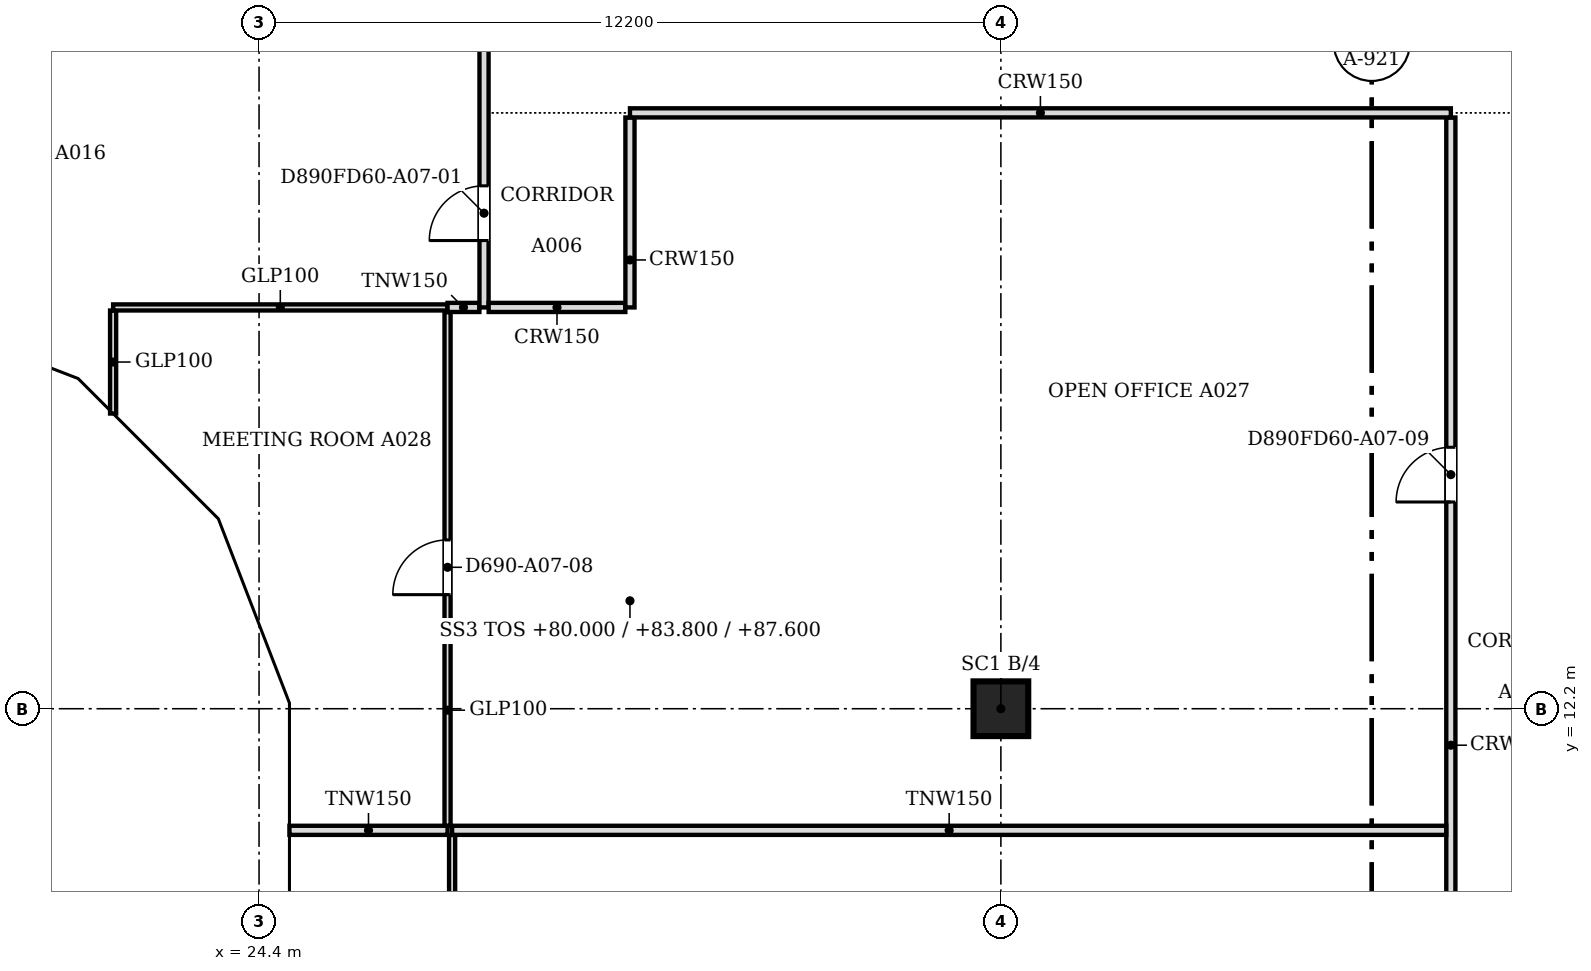
"""IFC4 building model, lengths in metres.
Left out: names, types, materials, properties, quantities, classifications, styles, units other than length and angle.
Written with IfcOpenShell. Run it as: python <this file> out.ifc"""

import sys

from ifc_helpers import new_model, si_unit, direction, frame, frame_2d, origin, origin_2d, place, context, subcontext, project, spatial, polyline, rectangle, outline, extrude, faceted_brep, source, transform, mapped, element, fill, save


model = new_model("IFC4")
c1 = context("Model", 3, precision=1e-05, world=origin(), true_north=direction((0.0, 1.0)))
c2 = subcontext(c1, "Body", "Model", "MODEL_VIEW")
j1 = project(units=[si_unit("LENGTHUNIT", "METRE"), si_unit("PLANEANGLEUNIT", "RADIAN")], contexts=[c1])
p1 = place(None, origin())
s1 = spatial("IfcSite", under=j1, at=p1, CompositionType="ELEMENT")
p2 = place(p1, origin())
s2 = spatial("IfcBuilding", under=s1, at=p2, CompositionType="ELEMENT")
p3 = place(p2, frame((0.0, 0.0, 80.0)))
s3 = spatial("IfcBuildingStorey", under=s2, at=p3, CompositionType="ELEMENT", Elevation=80.0)
p4 = place(p3, frame((36.6, 12.2, 0.0), z_axis=(0.0, 0.0, 1.0), x_axis=(1.0, 0.0, 0.0)))
e1 = element("IfcColumn", 1, at=p4, inside=s3, PredefinedType="COLUMN", context=c2, shape_type="SweptSolid", body=[
    extrude(rectangle(XDim=0.9, YDim=0.9, at=origin_2d()), origin(), (0.0, 0.0, 1.0), 3.6),
])
m1 = source(origin(), c2, "Body", "Brep", [
    faceted_brep([(3.096, -0.25, 7.536), (0.047, -0.25, 3.856), (0.047, -0.25, 3.744), (3.096, -0.25, 0.064), (0.0, 0.25, 3.8), (3.149, 0.25, 7.6), (3.202, 0.25, 7.536), (3.202, 0.25, 0.064), (3.149, 0.25, 0.0), (3.149, -0.0, 0.0), (3.149, -0.0, 7.6), (0.0, 0.0, 3.8)], [[[0, 1, 2, 3]], [[4, 5, 6, 7, 8]], [[8, 7, 9]], [[6, 5, 10]], [[5, 4, 11, 1, 0, 10]], [[4, 8, 9, 3, 2, 11]], [[11, 2, 1]], [[3, 9, 7, 6, 10, 0]]]),
])
p5 = place(p3, frame((18.346, 18.55, -3.8), z_axis=(0.0, 0.0, 1.0), x_axis=(0.932985567668, -0.359913782069, 0.0)))
e2 = element("IfcWall", 2, at=p5, inside=s3, PredefinedType="SOLIDWALL", context=c2, shape_type="MappedRepresentation", body=[
    mapped(m1, transform((0.0, 0.0, 0.0), scale=1.0)),
])
m2 = source(origin(), c2, "Body", "SweptSolid", [
    extrude(outline(polyline([(2.949, 6.967), (0.325, 3.8), (2.949, 0.633), (2.949, 6.967)])), frame((0.0, 0.26, 0.0), z_axis=(0.0, -1.0, 0.0), x_axis=(1.0, 0.0, 0.0)), (0.0, 0.0, 1.0), 0.52),
])
p6 = place(p5, origin())
e3 = element("IfcOpeningElement", 3, at=p6, cuts=e2, PredefinedType="OPENING", context=c2, shape_type="MappedRepresentation", body=[
    mapped(m2, transform((0.0, 0.0, 0.0), scale=1.0)),
])
m3 = source(origin(), c2, "Body", "Brep", [
    faceted_brep([(0.106, -0.25, 0.064), (3.156, -0.25, 3.736), (3.156, -0.25, 3.864), (0.106, -0.25, 7.536), (0.0, 0.25, 7.536), (0.053, 0.25, 7.6), (3.209, 0.25, 3.8), (0.053, 0.25, 0.0), (0.0, 0.25, 0.064), (3.209, -0.0, 3.8), (0.053, 0.0, 0.0), (0.053, 0.0, 7.6)], [[[0, 1, 2, 3]], [[4, 5, 6, 7, 8]], [[7, 6, 9, 1, 0, 10]], [[6, 5, 11, 3, 2, 9]], [[5, 4, 11]], [[8, 7, 10]], [[8, 10, 0, 3, 11, 4]], [[1, 9, 2]]]),
])
p7 = place(p3, frame((21.248, 17.454, -3.8), z_axis=(0.0, 0.0, 1.0), x_axis=(0.707106781187, -0.707106781187, 0.0)))
e4 = element("IfcWall", 4, at=p7, inside=s3, PredefinedType="SOLIDWALL", context=c2, shape_type="MappedRepresentation", body=[
    mapped(m3, transform((0.0, 0.0, 0.0), scale=1.0)),
])
m4 = source(origin(), c2, "Body", "SweptSolid", [
    extrude(outline(polyline([(0.253, 0.632), (2.884, 3.8), (0.253, 6.968), (0.253, 0.632)])), frame((0.0, 0.26, 0.0), z_axis=(0.0, -1.0, 0.0), x_axis=(1.0, 0.0, 0.0)), (0.0, 0.0, 1.0), 0.52),
])
p8 = place(p7, origin())
e5 = element("IfcOpeningElement", 5, at=p8, cuts=e4, PredefinedType="OPENING", context=c2, shape_type="MappedRepresentation", body=[
    mapped(m4, transform((0.0, 0.0, 0.0), scale=1.0)),
])
m5 = source(origin(), c2, "Body", "Brep", [
    faceted_brep([(3.103, -0.25, 7.544), (0.053, -0.25, 3.864), (0.053, -0.25, 3.736), (3.103, -0.25, 0.056), (0.0, 0.25, 3.8), (3.149, 0.25, 7.6), (3.196, 0.25, 7.543), (3.196, 0.25, 0.057), (3.149, 0.25, 0.0), (3.149, -0.0, 0.0), (3.149, -0.0, 7.6), (0.0, 0.0, 3.8)], [[[0, 1, 2, 3]], [[4, 5, 6, 7, 8]], [[8, 7, 9]], [[6, 5, 10]], [[5, 4, 11, 1, 0, 10]], [[4, 8, 9, 3, 2, 11]], [[11, 2, 1]], [[3, 9, 7, 6, 10, 0]]]),
])
p9 = place(p3, frame((23.517, 15.185, -3.8), z_axis=(0.0, 0.0, 1.0), x_axis=(0.359864468756, -0.933004589553, 0.0)))
e6 = element("IfcWall", 6, at=p9, inside=s3, PredefinedType="SOLIDWALL", context=c2, shape_type="MappedRepresentation", body=[
    mapped(m5, transform((0.0, 0.0, 0.0), scale=1.0)),
])
p10 = place(p9, origin())
e7 = element("IfcOpeningElement", 7, at=p10, cuts=e6, PredefinedType="OPENING", context=c2, shape_type="MappedRepresentation", body=[
    mapped(m2, transform((0.0, 0.0, 0.0), scale=1.0)),
])
m6 = source(origin(), c2, "Body", "Brep", [
    faceted_brep([(0.093, -0.25, 0.057), (3.143, -0.25, 3.8), (0.093, -0.25, 7.543), (0.0, 0.25, 7.544), (0.047, 0.25, 7.6), (3.143, 0.25, 3.8), (0.047, 0.25, 0.0), (0.0, 0.25, 0.056), (0.047, 0.0, 0.0), (0.047, 0.0, 7.6)], [[[0, 1, 2]], [[3, 4, 5, 6, 7]], [[6, 5, 1, 0, 8]], [[5, 4, 9, 2, 1]], [[4, 3, 9]], [[7, 6, 8]], [[7, 8, 0, 2, 9, 3]]]),
])
p11 = place(p3, frame((24.65, 12.293, -3.8), z_axis=(0.0, 0.0, 1.0), x_axis=(0.0, -1.0, 0.0)))
e8 = element("IfcWall", 8, at=p11, inside=s3, PredefinedType="SOLIDWALL", context=c2, shape_type="MappedRepresentation", body=[
    mapped(m6, transform((0.0, 0.0, 0.0), scale=1.0)),
])
m7 = source(origin(), c2, "Body", "SweptSolid", [
    extrude(outline(polyline([(0.247, 0.641), (2.821, 3.8), (0.247, 6.959), (0.247, 0.641)])), frame((0.0, 0.26, 0.0), z_axis=(0.0, -1.0, 0.0), x_axis=(1.0, 0.0, 0.0)), (0.0, 0.0, 1.0), 0.52),
])
p12 = place(p11, origin())
e9 = element("IfcOpeningElement", 9, at=p12, cuts=e8, PredefinedType="OPENING", context=c2, shape_type="MappedRepresentation", body=[
    mapped(m7, transform((0.0, 0.0, 0.0), scale=1.0)),
])
p13 = place(p2, frame((0.0, 0.0, 83.8)))
s4 = spatial("IfcBuildingStorey", under=s2, at=p13, CompositionType="ELEMENT", Elevation=83.8)
m8 = source(origin(), c2, "Body", "Brep", [
    faceted_brep([(0.093, -0.25, 0.056), (3.143, -0.25, 3.736), (3.143, -0.25, 3.864), (0.093, -0.25, 7.544), (0.0, 0.25, 7.543), (0.047, 0.25, 7.6), (3.196, 0.25, 3.8), (0.047, 0.25, 0.0), (0.0, 0.25, 0.057), (3.196, -0.0, 3.8), (0.047, 0.0, 0.0), (0.047, 0.0, 7.6)], [[[0, 1, 2, 3]], [[4, 5, 6, 7, 8]], [[7, 6, 9, 1, 0, 10]], [[6, 5, 11, 3, 2, 9]], [[5, 4, 11]], [[8, 7, 10]], [[8, 10, 0, 3, 11, 4]], [[1, 9, 2]]]),
])
p14 = place(p13, frame((18.303, 18.567, -3.8), z_axis=(0.0, 0.0, 1.0), x_axis=(0.932978940178, -0.359930961693, 0.0)))
e10 = element("IfcWall", 10, at=p14, inside=s4, PredefinedType="SOLIDWALL", context=c2, shape_type="MappedRepresentation", body=[
    mapped(m8, transform((0.0, 0.0, 0.0), scale=1.0)),
])
m9 = source(origin(), c2, "Body", "SweptSolid", [
    extrude(outline(polyline([(0.247, 0.633), (2.871, 3.8), (0.247, 6.967), (0.247, 0.633)])), frame((0.0, 0.26, 0.0), z_axis=(0.0, -1.0, 0.0), x_axis=(1.0, 0.0, 0.0)), (0.0, 0.0, 1.0), 0.52),
])
p15 = place(p14, origin())
e11 = element("IfcOpeningElement", 11, at=p15, cuts=e10, PredefinedType="OPENING", context=c2, shape_type="MappedRepresentation", body=[
    mapped(m9, transform((0.0, 0.0, 0.0), scale=1.0)),
])
m10 = source(origin(), c2, "Body", "Brep", [
    faceted_brep([(3.103, -0.25, 7.536), (0.053, -0.25, 3.864), (0.053, -0.25, 3.736), (3.103, -0.25, 0.064), (0.0, 0.25, 3.8), (3.156, 0.25, 7.6), (3.209, 0.25, 7.536), (3.209, 0.25, 0.064), (3.156, 0.25, 0.0), (3.156, -0.0, 0.0), (3.156, -0.0, 7.6), (0.0, 0.0, 3.8)], [[[0, 1, 2, 3]], [[4, 5, 6, 7, 8]], [[8, 7, 9]], [[6, 5, 10]], [[5, 4, 11, 1, 0, 10]], [[4, 8, 9, 3, 2, 11]], [[11, 2, 1]], [[3, 9, 7, 6, 10, 0]]]),
])
p16 = place(p13, frame((21.285, 17.417, -3.8), z_axis=(0.0, 0.0, 1.0), x_axis=(0.707106781187, -0.707106781187, 0.0)))
e12 = element("IfcWall", 12, at=p16, inside=s4, PredefinedType="SOLIDWALL", context=c2, shape_type="MappedRepresentation", body=[
    mapped(m10, transform((0.0, 0.0, 0.0), scale=1.0)),
])
m11 = source(origin(), c2, "Body", "SweptSolid", [
    extrude(outline(polyline([(2.956, 6.968), (0.325, 3.8), (2.956, 0.632), (2.956, 6.968)])), frame((0.0, 0.26, 0.0), z_axis=(0.0, -1.0, 0.0), x_axis=(1.0, 0.0, 0.0)), (0.0, 0.0, 1.0), 0.52),
])
p17 = place(p16, origin())
e13 = element("IfcOpeningElement", 13, at=p17, cuts=e12, PredefinedType="OPENING", context=c2, shape_type="MappedRepresentation", body=[
    mapped(m11, transform((0.0, 0.0, 0.0), scale=1.0)),
])
m12 = source(origin(), c2, "Body", "Brep", [
    faceted_brep([(0.106, -0.25, 0.064), (3.156, -0.25, 3.744), (3.156, -0.25, 3.856), (0.106, -0.25, 7.536), (0.0, 0.25, 7.536), (0.053, 0.25, 7.6), (3.202, 0.25, 3.8), (0.053, 0.25, 0.0), (0.0, 0.25, 0.064), (3.202, -0.0, 3.8), (0.053, 0.0, 0.0), (0.053, 0.0, 7.6)], [[[0, 1, 2, 3]], [[4, 5, 6, 7, 8]], [[7, 6, 9, 1, 0, 10]], [[6, 5, 11, 3, 2, 9]], [[5, 4, 11]], [[8, 7, 10]], [[8, 10, 0, 3, 11, 4]], [[1, 9, 2]]]),
])
p18 = place(p13, frame((23.497, 15.234, -3.8), z_axis=(0.0, 0.0, 1.0), x_axis=(0.359913782069, -0.932985567668, 0.0)))
e14 = element("IfcWall", 14, at=p18, inside=s4, PredefinedType="SOLIDWALL", context=c2, shape_type="MappedRepresentation", body=[
    mapped(m12, transform((0.0, 0.0, 0.0), scale=1.0)),
])
m13 = source(origin(), c2, "Body", "SweptSolid", [
    extrude(outline(polyline([(0.253, 0.633), (2.878, 3.8), (0.253, 6.967), (0.253, 0.633)])), frame((0.0, 0.26, 0.0), z_axis=(0.0, -1.0, 0.0), x_axis=(1.0, 0.0, 0.0)), (0.0, 0.0, 1.0), 0.52),
])
p19 = place(p18, origin())
e15 = element("IfcOpeningElement", 15, at=p19, cuts=e14, PredefinedType="OPENING", context=c2, shape_type="MappedRepresentation", body=[
    mapped(m13, transform((0.0, 0.0, 0.0), scale=1.0)),
])
m14 = source(origin(), c2, "Body", "Brep", [
    faceted_brep([(3.096, -0.25, 0.0), (6.1, -0.25, 3.8), (3.096, -0.25, 7.6), (0.047, -0.25, 3.857), (0.047, -0.25, 3.743), (0.0, 0.25, 3.8), (3.096, 0.25, 7.6), (6.053, 0.25, 3.859), (6.053, 0.25, 3.741), (3.096, 0.25, 0.0), (6.1, -0.0, 3.8), (0.0, 0.0, 3.8)], [[[0, 1, 2, 3, 4]], [[5, 6, 7, 8, 9]], [[9, 8, 10, 1, 0]], [[7, 6, 2, 1, 10]], [[6, 5, 11, 3, 2]], [[5, 9, 0, 4, 11]], [[11, 4, 3]], [[10, 8, 7]]]),
])
p20 = place(p13, frame((24.65, 12.247, -3.8), z_axis=(0.0, 0.0, 1.0), x_axis=(0.0, -1.0, 0.0)))
e16 = element("IfcWall", 16, at=p20, inside=s4, PredefinedType="SOLIDWALL", context=c2, shape_type="MappedRepresentation", body=[
    mapped(m14, transform((0.0, 0.0, 0.0), scale=1.0)),
])
m15 = source(origin(), c2, "Body", "SweptSolid", [
    extrude(outline(polyline([(3.094, 0.399), (5.781, 3.8), (3.094, 7.201), (0.323, 3.8), (3.094, 0.399)])), frame((0.0, 0.26, 0.0), z_axis=(0.0, -1.0, 0.0), x_axis=(1.0, 0.0, 0.0)), (0.0, 0.0, 1.0), 0.52),
])
p21 = place(p20, origin())
e17 = element("IfcOpeningElement", 17, at=p21, cuts=e16, PredefinedType="OPENING", context=c2, shape_type="MappedRepresentation", body=[
    mapped(m15, transform((0.0, 0.0, 0.0), scale=1.0)),
])
p22 = place(p3, frame((44.0, 0.5, 0.0), z_axis=(0.0, 0.0, 1.0), x_axis=(0.0, 1.0, 0.0)))
e18 = element("IfcWall", 18, at=p22, inside=s3, PredefinedType="PARTITIONING", context=c2, shape_type="SweptSolid", body=[
    extrude(rectangle(XDim=21.424, YDim=0.15, at=frame_2d((10.712, 0.0))), origin(), (0.0, 0.0, 1.0), 3.067),
])
m16 = source(origin(), c2, "Body", "SweptSolid", [
    extrude(rectangle(XDim=0.9, YDim=2.1, at=frame_2d((0.45, 1.05))), frame((0.0, 0.085, 0.0), z_axis=(0.0, -1.0, 0.0), x_axis=(1.0, 0.0, 0.0)), (0.0, 0.0, 1.0), 0.17),
])
p23 = place(p22, frame((6.2, 0.0, 0.0)))
e19 = element("IfcOpeningElement", 19, at=p23, cuts=e18, PredefinedType="OPENING", context=c2, shape_type="MappedRepresentation", body=[
    mapped(m16, transform((0.0, 0.0, 0.0), scale=1.0)),
])
p24 = place(p22, frame((15.1, 0.0, 0.0)))
e20 = element("IfcOpeningElement", 20, at=p24, cuts=e18, PredefinedType="OPENING", context=c2, shape_type="MappedRepresentation", body=[
    mapped(m16, transform((0.0, 0.0, 0.0), scale=1.0)),
])
p25 = place(p3, frame((27.575, 4.2, 0.0), z_axis=(0.0, 0.0, 1.0), x_axis=(0.0, 1.0, 0.0)))
e21 = element("IfcWall", 21, at=p25, inside=s3, PredefinedType="PARTITIONING", context=c2, shape_type="SweptSolid", body=[
    extrude(rectangle(XDim=5.924, YDim=0.1, at=frame_2d((2.962, 0.0))), origin(), (0.0, 0.0, 1.0), 3.067),
])
m17 = source(origin(), c2, "Body", "SweptSolid", [
    extrude(rectangle(XDim=0.9, YDim=2.1, at=frame_2d((0.45, 1.05))), frame((0.0, 0.06, 0.0), z_axis=(0.0, -1.0, 0.0), x_axis=(1.0, 0.0, 0.0)), (0.0, 0.0, 1.0), 0.12),
])
p26 = place(p25, frame((2.5, 0.0, 0.0)))
e22 = element("IfcOpeningElement", 22, at=p26, cuts=e21, PredefinedType="OPENING", context=c2, shape_type="MappedRepresentation", body=[
    mapped(m17, transform((0.0, 0.0, 0.0), scale=1.0)),
])
p27 = place(p3, frame((24.9, 10.2, 0.0), z_axis=(0.0, 0.0, 1.0), x_axis=(1.0, 0.0, 0.0)))
e23 = element("IfcWall", 23, at=p27, inside=s3, PredefinedType="PARTITIONING", context=c2, shape_type="SweptSolid", body=[
    extrude(rectangle(XDim=2.6, YDim=0.15, at=frame_2d((1.3, 0.0))), origin(), (0.0, 0.0, 1.0), 3.067),
])
p28 = place(p3, frame((27.575, 10.2, 0.0), z_axis=(0.0, 0.0, 1.0), x_axis=(1.0, 0.0, 0.0)))
e24 = element("IfcWall", 24, at=p28, inside=s3, PredefinedType="PARTITIONING", context=c2, shape_type="SweptSolid", body=[
    extrude(rectangle(XDim=16.349, YDim=0.15, at=frame_2d((8.175, 0.0))), origin(), (0.0, 0.0, 1.0), 3.067),
])
p29 = place(p3, frame((27.5, 10.276, 0.0), z_axis=(0.0, 0.0, 1.0), x_axis=(0.0, 1.0, 0.0)))
e25 = element("IfcWall", 25, at=p29, inside=s3, PredefinedType="PARTITIONING", context=c2, shape_type="SweptSolid", body=[
    extrude(rectangle(XDim=8.448, YDim=0.1, at=frame_2d((4.224, 0.0))), origin(), (0.0, 0.0, 1.0), 3.067),
])
p30 = place(p29, frame((3.8, 0.0, 0.0)))
e26 = element("IfcOpeningElement", 26, at=p30, cuts=e25, PredefinedType="OPENING", context=c2, shape_type="MappedRepresentation", body=[
    mapped(m17, transform((0.0, 0.0, 0.0), scale=1.0)),
])
p31 = place(p3, frame((22.0, 17.055, 0.0), z_axis=(0.0, 0.0, 1.0), x_axis=(0.0, 1.0, 0.0)))
e27 = element("IfcWall", 27, at=p31, inside=s3, PredefinedType="PARTITIONING", context=c2, shape_type="SweptSolid", body=[
    extrude(rectangle(XDim=1.694, YDim=0.1, at=frame_2d((0.847, 0.0))), origin(), (0.0, 0.0, 1.0), 3.067),
])
p32 = place(p3, frame((22.0, 18.8, 0.0), z_axis=(0.0, 0.0, 1.0), x_axis=(1.0, 0.0, 0.0)))
e28 = element("IfcWall", 28, at=p32, inside=s3, PredefinedType="PARTITIONING", context=c2, shape_type="SweptSolid", body=[
    extrude(rectangle(XDim=5.499, YDim=0.1, at=frame_2d((2.75, 0.0))), origin(), (0.0, 0.0, 1.0), 3.067),
])
p33 = place(p3, frame((27.5, 18.8, 0.0), z_axis=(0.0, 0.0, 1.0), x_axis=(1.0, 0.0, 0.0)))
e29 = element("IfcWall", 29, at=p33, inside=s3, PredefinedType="PARTITIONING", context=c2, shape_type="SweptSolid", body=[
    extrude(rectangle(XDim=0.524, YDim=0.15, at=frame_2d((0.262, 0.0))), origin(), (0.0, 0.0, 1.0), 3.067),
])
p34 = place(p3, frame((28.1, 18.8, 0.0), z_axis=(0.0, 0.0, 1.0), x_axis=(0.0, 1.0, 0.0)))
e30 = element("IfcWall", 30, at=p34, inside=s3, PredefinedType="PARTITIONING", context=c2, shape_type="SweptSolid", body=[
    extrude(rectangle(XDim=26.024, YDim=0.15, at=frame_2d((13.012, 0.0))), origin(), (0.0, 0.0, 1.0), 3.067),
])
p35 = place(p34, frame((1.1, 0.0, 0.0)))
e31 = element("IfcOpeningElement", 31, at=p35, cuts=e30, PredefinedType="OPENING", context=c2, shape_type="MappedRepresentation", body=[
    mapped(m16, transform((0.0, 0.0, 0.0), scale=1.0)),
])
m18 = source(origin(), c2, "Body", "SweptSolid", [
    extrude(rectangle(XDim=1.0, YDim=2.1, at=frame_2d((0.5, 1.05))), frame((0.0, 0.085, 0.0), z_axis=(0.0, -1.0, 0.0), x_axis=(1.0, 0.0, 0.0)), (0.0, 0.0, 1.0), 0.17),
])
p36 = place(p34, frame((22.951, 0.0, 0.0)))
e32 = element("IfcOpeningElement", 32, at=p36, cuts=e30, PredefinedType="OPENING", context=c2, shape_type="MappedRepresentation", body=[
    mapped(m18, transform((0.0, 0.0, 0.0), scale=1.0)),
])
p37 = place(p34, frame((8.2, 0.0, 0.0)))
e33 = element("IfcOpeningElement", 33, at=p37, cuts=e30, PredefinedType="OPENING", context=c2, shape_type="MappedRepresentation", body=[
    mapped(m16, transform((0.0, 0.0, 0.0), scale=1.0)),
])
p38 = place(p34, frame((15.8, 0.0, 0.0)))
e34 = element("IfcOpeningElement", 34, at=p38, cuts=e30, PredefinedType="OPENING", context=c2, shape_type="MappedRepresentation", body=[
    mapped(m18, transform((0.0, 0.0, 0.0), scale=1.0)),
])
p39 = place(p3, frame((28.176, 18.8, 0.0), z_axis=(0.0, 0.0, 1.0), x_axis=(1.0, 0.0, 0.0)))
e35 = element("IfcWall", 35, at=p39, inside=s3, PredefinedType="PARTITIONING", context=c2, shape_type="SweptSolid", body=[
    extrude(rectangle(XDim=2.248, YDim=0.15, at=frame_2d((1.124, 0.0))), origin(), (0.0, 0.0, 1.0), 3.067),
])
p40 = place(p3, frame((30.5, 18.8, 0.0), z_axis=(0.0, 0.0, 1.0), x_axis=(0.0, 1.0, 0.0)))
e36 = element("IfcWall", 36, at=p40, inside=s3, PredefinedType="PARTITIONING", context=c2, shape_type="SweptSolid", body=[
    extrude(rectangle(XDim=3.124, YDim=0.15, at=frame_2d((1.562, 0.0))), origin(), (0.0, 0.0, 1.0), 3.067),
])
p41 = place(p3, frame((30.5, 22.0, 0.0), z_axis=(0.0, 0.0, 1.0), x_axis=(1.0, 0.0, 0.0)))
e37 = element("IfcWall", 37, at=p41, inside=s3, PredefinedType="PARTITIONING", context=c2, shape_type="SweptSolid", body=[
    extrude(rectangle(XDim=13.5, YDim=0.15, at=frame_2d((6.75, 0.0))), origin(), (0.0, 0.0, 1.0), 3.067),
])
m19 = source(origin(), c2, "Body", "SweptSolid", [
    extrude(rectangle(XDim=0.9, YDim=2.1, at=frame_2d((0.45, 1.05))), frame((0.0, 0.025, 0.0), z_axis=(0.0, -1.0, 0.0), x_axis=(1.0, 0.0, 0.0)), (0.0, 0.0, 1.0), 0.05),
])
p42 = place(p35, origin())
e38 = element("IfcDoor", 38, at=p42, inside=s3, OperationType="SINGLE_SWING_LEFT", PredefinedType="DOOR", context=c2, shape_type="MappedRepresentation", body=[
    mapped(m19, transform((0.0, 0.0, 0.0), scale=1.0)),
])
fill(e31, e38)
p43 = place(p30, origin())
e39 = element("IfcDoor", 39, at=p43, inside=s3, OperationType="SINGLE_SWING_LEFT", PredefinedType="DOOR", context=c2, shape_type="MappedRepresentation", body=[
    mapped(m19, transform((0.0, 0.0, 0.0), scale=1.0)),
])
fill(e26, e39)
p44 = place(p24, origin())
e40 = element("IfcDoor", 40, at=p44, inside=s3, OperationType="SINGLE_SWING_LEFT", PredefinedType="DOOR", context=c2, shape_type="MappedRepresentation", body=[
    mapped(m19, transform((0.0, 0.0, 0.0), scale=1.0)),
])
fill(e20, e40)
save(model, sys.argv[1])
